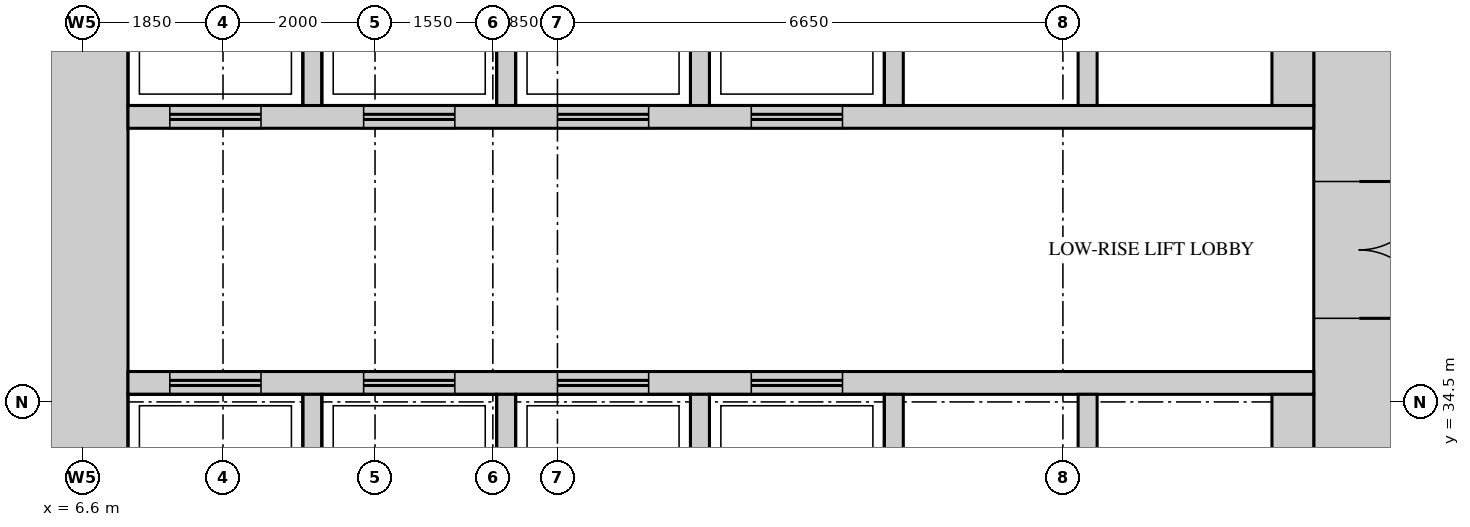
"""IFC4 building model, lengths in metres.
Left out: names, types, materials, properties, quantities, classifications, styles, units other than length and angle.
Written with IfcOpenShell. Run it as: python <this file> out.ifc"""

import sys

from ifc_helpers import new_model, si_unit, direction, frame, frame_2d, origin, place, context, subcontext, project, spatial, rectangle, extrude, source, transform, mapped, element, fill, save


model = new_model("IFC4")
c1 = context("Model", 3, precision=1e-05, world=origin(), true_north=direction((0.0, 1.0)))
c2 = subcontext(c1, "Body", "Model", "MODEL_VIEW")
j1 = project(units=[si_unit("LENGTHUNIT", "METRE"), si_unit("PLANEANGLEUNIT", "RADIAN")], contexts=[c1])
p1 = place(None, origin())
s1 = spatial("IfcSite", under=j1, at=p1, CompositionType="ELEMENT")
p2 = place(p1, origin())
s2 = spatial("IfcBuilding", under=s1, at=p2, CompositionType="ELEMENT")
p3 = place(p2, frame((0.0, 0.0, 51.0)))
s3 = spatial("IfcBuildingStorey", under=s2, at=p3, CompositionType="ELEMENT", Elevation=51.0)
m1 = source(origin(), c2, "Body", "SweptSolid", [
    extrude(rectangle(XDim=27.6, YDim=1.2, at=frame_2d((13.8, 0.0))), origin(), (0.0, 0.0, 1.0), 4.2),
])
p4 = place(p3, frame((23.4, 13.2, 0.0), z_axis=(0.0, 0.0, 1.0), x_axis=(0.0, 1.0, 0.0)))
e1 = element("IfcWall", 1, at=p4, inside=s3, PredefinedType="SHEAR", context=c2, shape_type="MappedRepresentation", body=[
    mapped(m1, transform((0.0, 0.0, 0.0))),
])
m2 = source(origin(), c2, "Body", "SweptSolid", [
    extrude(rectangle(XDim=1.8, YDim=2.1, at=frame_2d((0.9, 1.05))), frame((0.0, 0.61, 0.0), z_axis=(0.0, -1.0, 0.0), x_axis=(1.0, 0.0, 0.0)), (0.0, 0.0, 1.0), 1.22),
])
p5 = place(p4, frame((22.4, 0.0, 0.0)))
e2 = element("IfcOpeningElement", 2, at=p5, cuts=e1, PredefinedType="OPENING", context=c2, shape_type="MappedRepresentation", body=[
    mapped(m2, transform((0.0, 0.0, 0.0))),
])
m3 = source(origin(), c2, "Body", "SweptSolid", [
    extrude(rectangle(XDim=1.2, YDim=2.1, at=frame_2d((0.6, 1.05))), frame((0.0, 0.61, 0.0), z_axis=(0.0, -1.0, 0.0), x_axis=(1.0, 0.0, 0.0)), (0.0, 0.0, 1.0), 1.22),
])
p6 = place(p4, frame((15.15, 0.0, 0.0)))
e3 = element("IfcOpeningElement", 3, at=p6, cuts=e1, PredefinedType="OPENING", context=c2, shape_type="MappedRepresentation", body=[
    mapped(m3, transform((0.0, 0.0, 0.0))),
])
m4 = source(origin(), c2, "Body", "SweptSolid", [
    extrude(rectangle(XDim=0.9, YDim=2.1, at=frame_2d((0.45, 1.05))), frame((0.0, 0.61, 0.0), z_axis=(0.0, -1.0, 0.0), x_axis=(1.0, 0.0, 0.0)), (0.0, 0.0, 1.0), 1.22),
])
p7 = place(p4, frame((1.15, 0.0, 0.0)))
e4 = element("IfcOpeningElement", 4, at=p7, cuts=e1, PredefinedType="OPENING", context=c2, shape_type="MappedRepresentation", body=[
    mapped(m4, transform((0.0, 0.0, 0.0))),
])
p8 = place(p4, frame((4.35, 0.0, 0.0)))
e5 = element("IfcOpeningElement", 5, at=p8, cuts=e1, PredefinedType="OPENING", context=c2, shape_type="MappedRepresentation", body=[
    mapped(m4, transform((0.0, 0.0, 0.0))),
])
p9 = place(p4, frame((7.6, 0.0, 0.0)))
e6 = element("IfcOpeningElement", 6, at=p9, cuts=e1, PredefinedType="OPENING", context=c2, shape_type="MappedRepresentation", body=[
    mapped(m4, transform((0.0, 0.0, 0.0))),
])
p10 = place(p3, frame((6.6, 13.2, 0.0), z_axis=(0.0, 0.0, 1.0), x_axis=(0.0, 1.0, 0.0)))
e7 = element("IfcWall", 7, at=p10, inside=s3, PredefinedType="SHEAR", context=c2, shape_type="MappedRepresentation", body=[
    mapped(m1, transform((0.0, 0.0, 0.0))),
])
m5 = source(origin(), c2, "Body", "SweptSolid", [
    extrude(rectangle(XDim=15.6, YDim=0.3, at=frame_2d((7.8, 0.0))), origin(), (0.0, 0.0, 1.0), 4.2),
])
p11 = place(p3, frame((7.2, 38.25, 0.0), z_axis=(0.0, 0.0, 1.0), x_axis=(1.0, 0.0, 0.0)))
e8 = element("IfcWall", 8, at=p11, inside=s3, PredefinedType="STANDARD", context=c2, shape_type="MappedRepresentation", body=[
    mapped(m5, transform((0.0, 0.0, 0.0))),
])
m6 = source(origin(), c2, "Body", "SweptSolid", [
    extrude(rectangle(XDim=1.2, YDim=2.1, at=frame_2d((0.6, 1.05))), frame((0.0, 0.16, 0.0), z_axis=(0.0, -1.0, 0.0), x_axis=(1.0, 0.0, 0.0)), (0.0, 0.0, 1.0), 0.32),
])
p12 = place(p11, frame((0.55, 0.0, 0.0)))
e9 = element("IfcOpeningElement", 9, at=p12, cuts=e8, PredefinedType="OPENING", context=c2, shape_type="MappedRepresentation", body=[
    mapped(m6, transform((0.0, 0.0, 0.0))),
])
p13 = place(p11, frame((3.1, 0.0, 0.0)))
e10 = element("IfcOpeningElement", 10, at=p13, cuts=e8, PredefinedType="OPENING", context=c2, shape_type="MappedRepresentation", body=[
    mapped(m6, transform((0.0, 0.0, 0.0))),
])
p14 = place(p11, frame((5.65, 0.0, 0.0)))
e11 = element("IfcOpeningElement", 11, at=p14, cuts=e8, PredefinedType="OPENING", context=c2, shape_type="MappedRepresentation", body=[
    mapped(m6, transform((0.0, 0.0, 0.0))),
])
p15 = place(p11, frame((8.2, 0.0, 0.0)))
e12 = element("IfcOpeningElement", 12, at=p15, cuts=e8, PredefinedType="OPENING", context=c2, shape_type="MappedRepresentation", body=[
    mapped(m6, transform((0.0, 0.0, 0.0))),
])
p16 = place(p3, frame((7.2, 34.75, 0.0), z_axis=(0.0, 0.0, 1.0), x_axis=(1.0, 0.0, 0.0)))
e13 = element("IfcWall", 13, at=p16, inside=s3, PredefinedType="STANDARD", context=c2, shape_type="MappedRepresentation", body=[
    mapped(m5, transform((0.0, 0.0, 0.0))),
])
p17 = place(p16, frame((0.55, 0.0, 0.0)))
e14 = element("IfcOpeningElement", 14, at=p17, cuts=e13, PredefinedType="OPENING", context=c2, shape_type="MappedRepresentation", body=[
    mapped(m6, transform((0.0, 0.0, 0.0))),
])
p18 = place(p16, frame((3.1, 0.0, 0.0)))
e15 = element("IfcOpeningElement", 15, at=p18, cuts=e13, PredefinedType="OPENING", context=c2, shape_type="MappedRepresentation", body=[
    mapped(m6, transform((0.0, 0.0, 0.0))),
])
p19 = place(p16, frame((5.65, 0.0, 0.0)))
e16 = element("IfcOpeningElement", 16, at=p19, cuts=e13, PredefinedType="OPENING", context=c2, shape_type="MappedRepresentation", body=[
    mapped(m6, transform((0.0, 0.0, 0.0))),
])
p20 = place(p16, frame((8.2, 0.0, 0.0)))
e17 = element("IfcOpeningElement", 17, at=p20, cuts=e13, PredefinedType="OPENING", context=c2, shape_type="MappedRepresentation", body=[
    mapped(m6, transform((0.0, 0.0, 0.0))),
])
m7 = source(origin(), c2, "Body", "SweptSolid", [
    extrude(rectangle(XDim=2.4, YDim=0.25, at=frame_2d((1.2, 0.0))), origin(), (0.0, 0.0, 1.0), 4.2),
])
for number, where, z_axis, x_axis in (
    (18, (9.625, 38.4, 0.0), (0.0, 0.0, 1.0), (0.0, 1.0, 0.0)),
    (19, (12.175, 38.4, 0.0), (0.0, 0.0, 1.0), (0.0, 1.0, 0.0)),
    (20, (14.725, 38.4, 0.0), (0.0, 0.0, 1.0), (0.0, 1.0, 0.0)),
    (21, (17.275, 38.4, 0.0), (0.0, 0.0, 1.0), (0.0, 1.0, 0.0)),
    (22, (19.825, 38.4, 0.0), (0.0, 0.0, 1.0), (0.0, 1.0, 0.0)),
):
    element("IfcWall", number, at=place(p3, frame(where, z_axis=z_axis, x_axis=x_axis)), inside=s3, PredefinedType="STANDARD", context=c2, shape_type="MappedRepresentation", body=[
        mapped(m7, transform((0.0, 0.0, 0.0))),
    ])
m8 = source(origin(), c2, "Body", "SweptSolid", [
    extrude(rectangle(XDim=2.4, YDim=0.55, at=frame_2d((1.2, 0.0))), origin(), (0.0, 0.0, 1.0), 4.2),
])
p21 = place(p3, frame((22.525, 38.4, 0.0), z_axis=(0.0, 0.0, 1.0), x_axis=(0.0, 1.0, 0.0)))
e23 = element("IfcWall", 23, at=p21, inside=s3, PredefinedType="STANDARD", context=c2, shape_type="MappedRepresentation", body=[
    mapped(m8, transform((0.0, 0.0, 0.0))),
])
for number, where, z_axis, x_axis in (
    (24, (9.625, 32.2, 0.0), (0.0, 0.0, 1.0), (0.0, 1.0, 0.0)),
    (25, (12.175, 32.2, 0.0), (0.0, 0.0, 1.0), (0.0, 1.0, 0.0)),
    (26, (14.725, 32.2, 0.0), (0.0, 0.0, 1.0), (0.0, 1.0, 0.0)),
    (27, (17.275, 32.2, 0.0), (0.0, 0.0, 1.0), (0.0, 1.0, 0.0)),
    (28, (19.825, 32.2, 0.0), (0.0, 0.0, 1.0), (0.0, 1.0, 0.0)),
):
    element("IfcWall", number, at=place(p3, frame(where, z_axis=z_axis, x_axis=x_axis)), inside=s3, PredefinedType="STANDARD", context=c2, shape_type="MappedRepresentation", body=[
        mapped(m7, transform((0.0, 0.0, 0.0))),
    ])
p22 = place(p3, frame((22.525, 32.2, 0.0), z_axis=(0.0, 0.0, 1.0), x_axis=(0.0, 1.0, 0.0)))
e29 = element("IfcWall", 29, at=p22, inside=s3, PredefinedType="STANDARD", context=c2, shape_type="MappedRepresentation", body=[
    mapped(m8, transform((0.0, 0.0, 0.0))),
])
m9 = source(origin(), c2, "Body", "SweptSolid", [
    extrude(rectangle(XDim=1.8, YDim=2.1, at=frame_2d((0.9, 1.05))), frame((0.0, 0.55, 0.0), z_axis=(0.0, -1.0, 0.0), x_axis=(1.0, 0.0, 0.0)), (0.0, 0.0, 1.0), 1.1),
])
p23 = place(p5, origin())
e30 = element("IfcDoor", 30, at=p23, inside=s3, OperationType="DOUBLE_DOOR_SINGLE_SWING", PredefinedType="DOOR", context=c2, shape_type="MappedRepresentation", body=[
    mapped(m9, transform((0.0, 0.0, 0.0))),
])
fill(e2, e30)
m10 = source(origin(), c2, "Body", "SweptSolid", [
    extrude(rectangle(XDim=1.2, YDim=2.1, at=frame_2d((0.6, 1.05))), frame((0.0, 0.025, 0.0), z_axis=(0.0, -1.0, 0.0), x_axis=(1.0, 0.0, 0.0)), (0.0, 0.0, 1.0), 0.05),
])
p24 = place(p17, origin())
e31 = element("IfcDoor", 31, at=p24, inside=s3, OperationType="DOUBLE_DOOR_SLIDING", PredefinedType="DOOR", context=c2, shape_type="MappedRepresentation", body=[
    mapped(m10, transform((0.0, 0.0, 0.0))),
])
fill(e14, e31)
p25 = place(p18, origin())
e32 = element("IfcDoor", 32, at=p25, inside=s3, OperationType="DOUBLE_DOOR_SLIDING", PredefinedType="DOOR", context=c2, shape_type="MappedRepresentation", body=[
    mapped(m10, transform((0.0, 0.0, 0.0))),
])
fill(e15, e32)
p26 = place(p19, origin())
e33 = element("IfcDoor", 33, at=p26, inside=s3, OperationType="DOUBLE_DOOR_SLIDING", PredefinedType="DOOR", context=c2, shape_type="MappedRepresentation", body=[
    mapped(m10, transform((0.0, 0.0, 0.0))),
])
fill(e16, e33)
p27 = place(p20, origin())
e34 = element("IfcDoor", 34, at=p27, inside=s3, OperationType="DOUBLE_DOOR_SLIDING", PredefinedType="DOOR", context=c2, shape_type="MappedRepresentation", body=[
    mapped(m10, transform((0.0, 0.0, 0.0))),
])
fill(e17, e34)
p28 = place(p12, origin())
e35 = element("IfcDoor", 35, at=p28, inside=s3, OperationType="DOUBLE_DOOR_SLIDING", PredefinedType="DOOR", context=c2, shape_type="MappedRepresentation", body=[
    mapped(m10, transform((0.0, 0.0, 0.0))),
])
fill(e9, e35)
p29 = place(p13, origin())
e36 = element("IfcDoor", 36, at=p29, inside=s3, OperationType="DOUBLE_DOOR_SLIDING", PredefinedType="DOOR", context=c2, shape_type="MappedRepresentation", body=[
    mapped(m10, transform((0.0, 0.0, 0.0))),
])
fill(e10, e36)
p30 = place(p14, origin())
e37 = element("IfcDoor", 37, at=p30, inside=s3, OperationType="DOUBLE_DOOR_SLIDING", PredefinedType="DOOR", context=c2, shape_type="MappedRepresentation", body=[
    mapped(m10, transform((0.0, 0.0, 0.0))),
])
fill(e11, e37)
p31 = place(p15, origin())
e38 = element("IfcDoor", 38, at=p31, inside=s3, OperationType="DOUBLE_DOOR_SLIDING", PredefinedType="DOOR", context=c2, shape_type="MappedRepresentation", body=[
    mapped(m10, transform((0.0, 0.0, 0.0))),
])
fill(e12, e38)
save(model, sys.argv[1])
